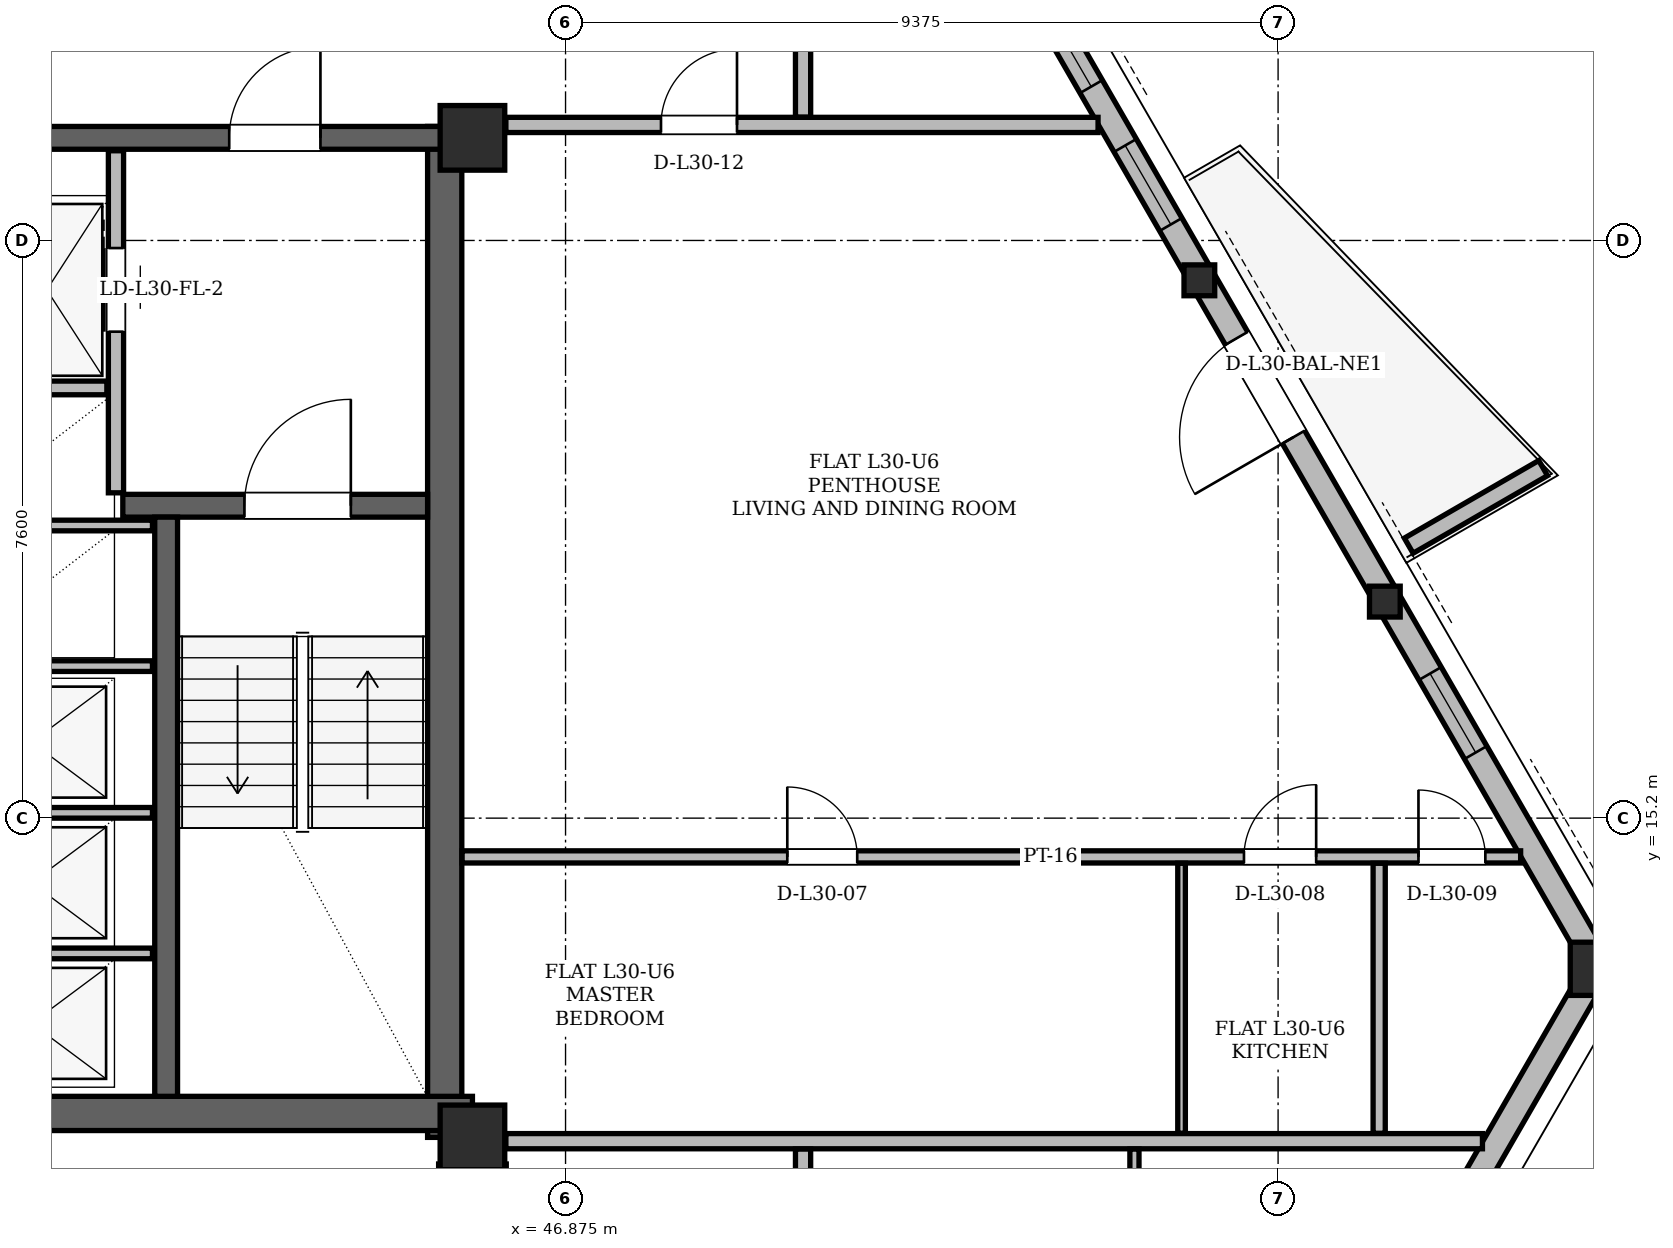
"""IFC4 building model, lengths in metres.
Left out: names, types, materials, properties, quantities, classifications, styles, units other than length and angle.
Written with IfcOpenShell. Run it as: python <this file> out.ifc"""

import sys

from ifc_helpers import new_model, si_unit, direction, frame, frame_2d, origin, origin_2d, place, context, subcontext, project, spatial, polyline, rectangle, hollow_rectangle, i_section, outline, extrude, element, fill, save


model = new_model("IFC4")
c1 = context("Model", 3, precision=1e-05, world=origin(), true_north=direction((0.0, 1.0)))
c2 = subcontext(c1, "Body", "Model", "MODEL_VIEW")
j1 = project(units=[si_unit("LENGTHUNIT", "METRE"), si_unit("PLANEANGLEUNIT", "RADIAN")], contexts=[c1])
p1 = place(None, origin())
s1 = spatial("IfcSite", under=j1, at=p1, CompositionType="ELEMENT")
p2 = place(p1, origin())
s2 = spatial("IfcBuilding", under=s1, at=p2, CompositionType="ELEMENT")
p3 = place(p2, frame((0.0, 0.0, 115.8)))
s3 = spatial("IfcBuildingStorey", under=s2, at=p3, CompositionType="ELEMENT", Elevation=115.8)
for number, where, z_axis, x_axis in (
    (1, (45.65, 11.0, 0.0), (0.0, 0.0, 1.0), (1.0, 0.0, 0.0)),
    (2, (45.65, 24.15, 0.0), (0.0, 0.0, 1.0), (1.0, 0.0, 0.0)),
):
    element("IfcColumn", number, at=place(p3, frame(where, z_axis=z_axis, x_axis=x_axis)), inside=s3, PredefinedType="COLUMN", context=c2, shape_type="SweptSolid", body=[
        extrude(hollow_rectangle(XDim=0.85, YDim=0.85, WallThickness=0.07, at=origin_2d()), origin(), (0.0, 0.0, 1.0), 3.6),
    ])
p4 = place(p3, frame((60.471, 13.255, 0.004), z_axis=(-0.015019891197, -0.020728809118, 0.999672305979), x_axis=(0.809768124835, -0.586750018323, 0.0)))
e3 = element("IfcColumn", 3, at=p4, inside=s3, PredefinedType="COLUMN", context=c2, shape_type="SweptSolid", body=[
    extrude(hollow_rectangle(XDim=0.7, YDim=0.7, WallThickness=0.055, at=origin_2d()), origin(), (0.0, 0.0, 1.0), 3.592),
])
for number, where, z_axis, x_axis in (
    (4, (57.685, 18.081, 0.004), (-0.017, -0.018, 1.0), (0.73, -0.683, 0.0)),
    (5, (55.247, 22.303, 0.004), (-0.018, -0.015, 1.0), (0.646, -0.763, 0.0)),
):
    element("IfcColumn", number, at=place(p3, frame(where, z_axis=z_axis, x_axis=x_axis)), inside=s3, PredefinedType="COLUMN", context=c2, shape_type="SweptSolid", body=[
        extrude(i_section(OverallWidth=0.404, OverallDepth=0.406, WebThickness=0.027, FlangeThickness=0.044, at=origin_2d()), origin(), (0.0, 0.0, 1.0), 3.592),
    ])
p5 = place(p3, frame((45.285, 11.0, 0.0), z_axis=(0.0, 0.0, 1.0), x_axis=(0.0, 1.0, 0.0)))
e6 = element("IfcWall", 6, at=p5, inside=s3, PredefinedType="SHEAR", context=c2, shape_type="SweptSolid", body=[
    extrude(rectangle(XDim=13.3, YDim=0.45, at=frame_2d((6.65, 0.0))), origin(), (0.0, 0.0, 1.0), 3.36),
])
p6 = place(p3, frame((38.55, 11.315, 0.0), z_axis=(0.0, 0.0, 1.0), x_axis=(1.0, 0.0, 0.0)))
e7 = element("IfcWall", 7, at=p6, inside=s3, PredefinedType="SHEAR", context=c2, shape_type="SweptSolid", body=[
    extrude(rectangle(XDim=7.1, YDim=0.45, at=frame_2d((3.55, 0.0))), origin(), (0.0, 0.0, 1.0), 3.36),
])
p7 = place(p3, frame((29.65, 24.15, 0.0), z_axis=(0.0, 0.0, 1.0), x_axis=(1.0, 0.0, 0.0)))
e8 = element("IfcWall", 8, at=p7, inside=s3, PredefinedType="SHEAR", context=c2, shape_type="SweptSolid", body=[
    extrude(rectangle(XDim=15.7, YDim=0.3, at=frame_2d((7.85, 0.0))), origin(), (0.0, 0.0, 1.0), 3.36),
])
p8 = place(p7, frame((1.7, 0.0, 0.0)))
e9 = element("IfcOpeningElement", 9, at=p8, cuts=e8, PredefinedType="OPENING", context=c2, shape_type="SweptSolid", body=[
    extrude(rectangle(XDim=1.2, YDim=2.2, at=frame_2d((0.6, 1.1))), frame((0.0, 0.15, 0.0), z_axis=(0.0, -1.0, 0.0), x_axis=(1.0, 0.0, 0.0)), (0.0, 0.0, 1.0), 0.3),
])
p9 = place(p7, frame((12.8, 0.0, 0.0)))
e10 = element("IfcOpeningElement", 10, at=p9, cuts=e8, PredefinedType="OPENING", context=c2, shape_type="SweptSolid", body=[
    extrude(rectangle(XDim=1.2, YDim=2.2, at=frame_2d((0.6, 1.1))), frame((0.0, 0.15, 0.0), z_axis=(0.0, -1.0, 0.0), x_axis=(1.0, 0.0, 0.0)), (0.0, 0.0, 1.0), 0.3),
])
p10 = place(p7, frame((6.55, 0.0, 0.0)))
e11 = element("IfcOpeningElement", 11, at=p10, cuts=e8, PredefinedType="OPENING", context=c2, shape_type="SweptSolid", body=[
    extrude(rectangle(XDim=0.9, YDim=2.05, at=frame_2d((0.45, 1.025))), frame((0.0, 0.15, 0.0), z_axis=(0.0, -1.0, 0.0), x_axis=(1.0, 0.0, 0.0)), (0.0, 0.0, 1.0), 0.3),
])
p11 = place(p7, frame((8.45, 0.0, 0.0)))
e12 = element("IfcOpeningElement", 12, at=p11, cuts=e8, PredefinedType="OPENING", context=c2, shape_type="SweptSolid", body=[
    extrude(rectangle(XDim=0.9, YDim=2.05, at=frame_2d((0.45, 1.025))), frame((0.0, 0.15, 0.0), z_axis=(0.0, -1.0, 0.0), x_axis=(1.0, 0.0, 0.0)), (0.0, 0.0, 1.0), 0.3),
])
p12 = place(p3, frame((41.05, 19.31, 0.0), z_axis=(0.0, 0.0, 1.0), x_axis=(1.0, 0.0, 0.0)))
e13 = element("IfcWall", 13, at=p12, inside=s3, PredefinedType="SHEAR", context=c2, shape_type="SweptSolid", body=[
    extrude(rectangle(XDim=4.01, YDim=0.3, at=frame_2d((2.005, 0.0))), origin(), (0.0, 0.0, 1.0), 3.36),
])
p13 = place(p12, frame((1.6, 0.0, 0.0)))
e14 = element("IfcOpeningElement", 14, at=p13, cuts=e13, PredefinedType="OPENING", context=c2, shape_type="SweptSolid", body=[
    extrude(rectangle(XDim=1.4, YDim=2.2, at=frame_2d((0.7, 1.1))), frame((0.0, 0.15, 0.0), z_axis=(0.0, -1.0, 0.0), x_axis=(1.0, 0.0, 0.0)), (0.0, 0.0, 1.0), 0.3),
])
p14 = place(p3, frame((41.62, 11.54, 0.0), z_axis=(0.0, 0.0, 1.0), x_axis=(0.0, 1.0, 0.0)))
e15 = element("IfcWall", 15, at=p14, inside=s3, PredefinedType="SHEAR", context=c2, shape_type="SweptSolid", body=[
    extrude(rectangle(XDim=7.62, YDim=0.3, at=frame_2d((3.81, 0.0))), origin(), (0.0, 0.0, 1.0), 3.36),
])
p15 = place(p3, frame((54.913, 3.629, 0.0), z_axis=(0.0, 0.0, 1.0), x_axis=(0.500013359164, 0.86601769073, 0.0)))
e16 = element("IfcWall", 16, at=p15, inside=s3, PredefinedType="SOLIDWALL", context=c2, shape_type="SweptSolid", body=[
    extrude(rectangle(XDim=11.115, YDim=0.34, at=frame_2d((5.558, 0.0))), origin(), (0.0, 0.0, 1.0), 2.578),
])
p16 = place(p3, frame((60.471, 13.255, 0.0), z_axis=(0.0, 0.0, 1.0), x_axis=(-0.500009004027, 0.866020205245, 0.0)))
e17 = element("IfcWall", 17, at=p16, inside=s3, PredefinedType="SOLIDWALL", context=c2, shape_type="SweptSolid", body=[
    extrude(rectangle(XDim=15.463, YDim=0.34, at=frame_2d((7.731, 0.0))), origin(), (0.0, 0.0, 1.0), 2.578),
])
p17 = place(p16, frame((8.034, 0.0, 0.0)))
e18 = element("IfcOpeningElement", 18, at=p17, cuts=e17, PredefinedType="OPENING", context=c2, shape_type="SweptSolid", body=[
    extrude(rectangle(XDim=1.5, YDim=2.2, at=frame_2d((0.75, 1.1))), frame((0.0, 0.17, 0.0), z_axis=(0.0, -1.0, 0.0), x_axis=(1.0, 0.0, 0.0)), (0.0, 0.0, 1.0), 0.34),
])
p18 = place(p16, frame((3.242, 0.0, 0.85)))
e19 = element("IfcOpeningElement", 19, at=p18, cuts=e17, PredefinedType="OPENING", context=c2, shape_type="SweptSolid", body=[
    extrude(rectangle(XDim=1.2, YDim=1.48, at=frame_2d((0.6, 0.74))), frame((0.0, 0.17, 0.0), z_axis=(0.0, -1.0, 0.0), x_axis=(1.0, 0.0, 0.0)), (0.0, 0.0, 1.0), 0.34),
])
p19 = place(p16, frame((11.264, 0.0, 0.85)))
e20 = element("IfcOpeningElement", 20, at=p19, cuts=e17, PredefinedType="OPENING", context=c2, shape_type="SweptSolid", body=[
    extrude(rectangle(XDim=1.2, YDim=1.48, at=frame_2d((0.6, 0.74))), frame((0.0, 0.17, 0.0), z_axis=(0.0, -1.0, 0.0), x_axis=(1.0, 0.0, 0.0)), (0.0, 0.0, 1.0), 0.34),
])
p20 = place(p16, frame((13.359, 0.0, 0.85)))
e21 = element("IfcOpeningElement", 21, at=p20, cuts=e17, PredefinedType="OPENING", context=c2, shape_type="SweptSolid", body=[
    extrude(rectangle(XDim=1.2, YDim=1.48, at=frame_2d((0.6, 0.74))), frame((0.0, 0.17, 0.0), z_axis=(0.0, -1.0, 0.0), x_axis=(1.0, 0.0, 0.0)), (0.0, 0.0, 1.0), 0.34),
])
p21 = place(p3, frame((57.969, 18.784, 0.0), z_axis=(0.0, 0.0, 1.0), x_axis=(0.866042246008, 0.499970827278, 0.0)))
e22 = element("IfcWall", 22, at=p21, inside=s3, PredefinedType="PARAPET", context=c2, shape_type="SweptSolid", body=[
    extrude(outline(polyline([(0.0, 0.0), (2.042, 0.0), (2.042, 1.1), (0.0, 1.32), (0.0, 0.0)])), frame((0.0, 0.115, 0.0), z_axis=(0.0, -1.0, 0.0), x_axis=(1.0, 0.0, 0.0)), (0.0, 0.0, 1.0), 0.23),
])
p22 = place(p3, frame((40.96, 19.48, 0.0), z_axis=(0.0, 0.0, 1.0), x_axis=(0.0, 1.0, 0.0)))
e23 = element("IfcWall", 23, at=p22, inside=s3, PredefinedType="PARTITIONING", context=c2, shape_type="SweptSolid", body=[
    extrude(rectangle(XDim=4.5, YDim=0.2, at=frame_2d((2.25, 0.0))), origin(), (0.0, 0.0, 1.0), 2.4),
])
p23 = place(p22, frame((2.12, 0.0, 0.0)))
e24 = element("IfcOpeningElement", 24, at=p23, cuts=e23, PredefinedType="OPENING", context=c2, shape_type="SweptSolid", body=[
    extrude(rectangle(XDim=1.1, YDim=2.2, at=frame_2d((0.55, 1.1))), frame((0.0, 0.1, 0.0), z_axis=(0.0, -1.0, 0.0), x_axis=(1.0, 0.0, 0.0)), (0.0, 0.0, 1.0), 0.2),
])
p24 = place(p3, frame((39.26, 20.86, 0.0), z_axis=(0.0, 0.0, 1.0), x_axis=(1.0, 0.0, 0.0)))
e25 = element("IfcWall", 25, at=p24, inside=s3, PredefinedType="PARTITIONING", context=c2, shape_type="SweptSolid", body=[
    extrude(rectangle(XDim=1.58, YDim=0.18, at=frame_2d((0.79, 0.0))), origin(), (0.0, 0.0, 1.0), 3.36),
])
for number, where, z_axis, x_axis in (
    (26, (38.78, 13.42, 0.0), (0.0, 0.0, 1.0), (1.0, 0.0, 0.0)),
    (27, (38.78, 15.27, 0.0), (0.0, 0.0, 1.0), (1.0, 0.0, 0.0)),
    (28, (38.78, 17.2, 0.0), (0.0, 0.0, 1.0), (1.0, 0.0, 0.0)),
    (29, (38.78, 19.05, 0.0), (0.0, 0.0, 1.0), (1.0, 0.0, 0.0)),
):
    element("IfcWall", number, at=place(p3, frame(where, z_axis=z_axis, x_axis=x_axis)), inside=s3, PredefinedType="PARTITIONING", context=c2, shape_type="SweptSolid", body=[
        extrude(rectangle(XDim=2.66, YDim=0.14, at=frame_2d((1.33, 0.0))), origin(), (0.0, 0.0, 1.0), 3.36),
    ])
p25 = place(p3, frame((45.205, 10.55, 0.0), z_axis=(0.0, 0.0, 1.0), x_axis=(1.0, 0.0, 0.0)))
e30 = element("IfcWall", 30, at=p25, inside=s3, PredefinedType="PARTITIONING", context=c2, shape_type="SweptSolid", body=[
    extrude(rectangle(XDim=0.89, YDim=0.2, at=frame_2d((0.445, 0.0))), origin(), (0.0, 0.0, 1.0), 3.36),
])
p26 = place(p3, frame((46.09, 10.95, 0.0), z_axis=(0.0, 0.0, 1.0), x_axis=(1.0, 0.0, 0.0)))
e31 = element("IfcWall", 31, at=p26, inside=s3, PredefinedType="PARTITIONING", context=c2, shape_type="SweptSolid", body=[
    extrude(rectangle(XDim=12.849, YDim=0.2, at=frame_2d((6.424, 0.0))), origin(), (0.0, 0.0, 1.0), 2.814),
])
p27 = place(p3, frame((45.514, 14.69, 0.0), z_axis=(0.0, 0.0, 1.0), x_axis=(1.0, 0.0, 0.0)))
e32 = element("IfcWall", 32, at=p27, inside=s3, PredefinedType="PARTITIONING", context=c2, shape_type="SweptSolid", body=[
    extrude(rectangle(XDim=13.927, YDim=0.16, at=frame_2d((6.964, 0.0))), origin(), (0.0, 0.0, 1.0), 2.4),
])
p28 = place(p27, frame((4.279, 0.0, 0.0)))
e33 = element("IfcOpeningElement", 33, at=p28, cuts=e32, PredefinedType="OPENING", context=c2, shape_type="SweptSolid", body=[
    extrude(rectangle(XDim=0.92, YDim=2.12, at=frame_2d((0.46, 1.06))), frame((0.0, 0.08, 0.0), z_axis=(0.0, -1.0, 0.0), x_axis=(1.0, 0.0, 0.0)), (0.0, 0.0, 1.0), 0.16),
])
p29 = place(p27, frame((10.287, 0.0, 0.0)))
e34 = element("IfcOpeningElement", 34, at=p29, cuts=e32, PredefinedType="OPENING", context=c2, shape_type="SweptSolid", body=[
    extrude(rectangle(XDim=0.95, YDim=2.1, at=frame_2d((0.475, 1.05))), frame((0.0, 0.08, 0.0), z_axis=(0.0, -1.0, 0.0), x_axis=(1.0, 0.0, 0.0)), (0.0, 0.0, 1.0), 0.16),
])
p30 = place(p27, frame((12.583, 0.0, 0.0)))
e35 = element("IfcOpeningElement", 35, at=p30, cuts=e32, PredefinedType="OPENING", context=c2, shape_type="SweptSolid", body=[
    extrude(rectangle(XDim=0.88, YDim=2.08, at=frame_2d((0.44, 1.04))), frame((0.0, 0.08, 0.0), z_axis=(0.0, -1.0, 0.0), x_axis=(1.0, 0.0, 0.0)), (0.0, 0.0, 1.0), 0.16),
])
p31 = place(p3, frame((46.09, 24.32, 0.0), z_axis=(0.0, 0.0, 1.0), x_axis=(1.0, 0.0, 0.0)))
e36 = element("IfcWall", 36, at=p31, inside=s3, PredefinedType="PARTITIONING", context=c2, shape_type="SweptSolid", body=[
    extrude(rectangle(XDim=7.791, YDim=0.2, at=frame_2d((3.896, 0.0))), origin(), (0.0, 0.0, 1.0), 2.946),
])
p32 = place(p31, frame((2.041, 0.0, 0.0)))
e37 = element("IfcOpeningElement", 37, at=p32, cuts=e36, PredefinedType="OPENING", context=c2, shape_type="SweptSolid", body=[
    extrude(rectangle(XDim=1.0, YDim=2.18, at=frame_2d((0.5, 1.09))), frame((0.0, 0.1, 0.0), z_axis=(0.0, -1.0, 0.0), x_axis=(1.0, 0.0, 0.0)), (0.0, 0.0, 1.0), 0.2),
])
for number, where, z_axis, x_axis in (
    (38, (50.0, 9.404, 0.0), (0.0, 0.0, 1.0), (0.0, 1.0, 0.0)),
    (39, (50.0, 24.424, 0.0), (0.0, 0.0, 1.0), (0.0, 1.0, 0.0)),
):
    element("IfcWall", number, at=place(p3, frame(where, z_axis=z_axis, x_axis=x_axis)), inside=s3, PredefinedType="PARTITIONING", context=c2, shape_type="SweptSolid", body=[
        extrude(rectangle(XDim=1.442, YDim=0.2, at=frame_2d((0.721, 0.0))), origin(), (0.0, 0.0, 1.0), 3.36),
    ])
p33 = place(p3, frame((54.36, 3.803, 0.0), z_axis=(0.0, 0.0, 1.0), x_axis=(0.0, 1.0, 0.0)))
e40 = element("IfcWall", 40, at=p33, inside=s3, PredefinedType="PARTITIONING", context=c2, shape_type="SweptSolid", body=[
    extrude(rectangle(XDim=7.043, YDim=0.12, at=frame_2d((3.521, 0.0))), origin(), (0.0, 0.0, 1.0), 2.814),
])
p34 = place(p33, frame((3.121, 0.0, 0.0)))
e41 = element("IfcOpeningElement", 41, at=p34, cuts=e40, PredefinedType="OPENING", context=c2, shape_type="SweptSolid", body=[
    extrude(rectangle(XDim=0.88, YDim=2.08, at=frame_2d((0.44, 1.04))), frame((0.0, 0.06, 0.0), z_axis=(0.0, -1.0, 0.0), x_axis=(1.0, 0.0, 0.0)), (0.0, 0.0, 1.0), 0.12),
])
p35 = place(p3, frame((54.98, 11.054, 0.0), z_axis=(0.0, 0.0, 1.0), x_axis=(0.0, 1.0, 0.0)))
e42 = element("IfcWall", 42, at=p35, inside=s3, PredefinedType="PARTITIONING", context=c2, shape_type="SweptSolid", body=[
    extrude(rectangle(XDim=3.552, YDim=0.1, at=frame_2d((1.776, 0.0))), origin(), (0.0, 0.0, 1.0), 2.814),
])
p36 = place(p3, frame((57.58, 11.054, 0.0), z_axis=(0.0, 0.0, 1.0), x_axis=(0.0, 1.0, 0.0)))
e43 = element("IfcWall", 43, at=p36, inside=s3, PredefinedType="PARTITIONING", context=c2, shape_type="SweptSolid", body=[
    extrude(rectangle(XDim=3.552, YDim=0.16, at=frame_2d((1.776, 0.0))), origin(), (0.0, 0.0, 1.0), 2.814),
])
p37 = place(p17, origin())
e44 = element("IfcDoor", 44, at=p37, inside=s3, OperationType="SINGLE_SWING_LEFT", PredefinedType="DOOR", context=c2, shape_type="SweptSolid", body=[
    extrude(rectangle(XDim=1.5, YDim=2.2, at=frame_2d((0.75, 1.1))), frame((0.0, 0.025, 0.0), z_axis=(0.0, -1.0, 0.0), x_axis=(1.0, 0.0, 0.0)), (0.0, 0.0, 1.0), 0.05),
])
fill(e18, e44)
p38 = place(p18, origin())
e45 = element("IfcWindow", 45, at=p38, inside=s3, PartitioningType="SINGLE_PANEL", PredefinedType="WINDOW", context=c2, shape_type="SweptSolid", body=[
    extrude(rectangle(XDim=1.2, YDim=1.48, at=frame_2d((0.6, 0.74))), frame((0.0, 0.03, 0.0), z_axis=(0.0, -1.0, 0.0), x_axis=(1.0, 0.0, 0.0)), (0.0, 0.0, 1.0), 0.06),
])
fill(e19, e45)
p39 = place(p19, origin())
e46 = element("IfcWindow", 46, at=p39, inside=s3, PartitioningType="SINGLE_PANEL", PredefinedType="WINDOW", context=c2, shape_type="SweptSolid", body=[
    extrude(rectangle(XDim=1.2, YDim=1.48, at=frame_2d((0.6, 0.74))), frame((0.0, 0.03, 0.0), z_axis=(0.0, -1.0, 0.0), x_axis=(1.0, 0.0, 0.0)), (0.0, 0.0, 1.0), 0.06),
])
fill(e20, e46)
p40 = place(p20, origin())
e47 = element("IfcWindow", 47, at=p40, inside=s3, PartitioningType="SINGLE_PANEL", PredefinedType="WINDOW", context=c2, shape_type="SweptSolid", body=[
    extrude(rectangle(XDim=1.2, YDim=1.48, at=frame_2d((0.6, 0.74))), frame((0.0, 0.03, 0.0), z_axis=(0.0, -1.0, 0.0), x_axis=(1.0, 0.0, 0.0)), (0.0, 0.0, 1.0), 0.06),
])
fill(e21, e47)
p41 = place(p23, origin())
e48 = element("IfcDoor", 48, at=p41, inside=s3, OperationType="SLIDING_TO_RIGHT", PredefinedType="DOOR", context=c2, shape_type="SweptSolid", body=[
    extrude(rectangle(XDim=1.1, YDim=2.2, at=frame_2d((0.55, 1.1))), frame((0.0, 0.025, 0.0), z_axis=(0.0, -1.0, 0.0), x_axis=(1.0, 0.0, 0.0)), (0.0, 0.0, 1.0), 0.05),
])
fill(e24, e48)
p42 = place(p13, origin())
e49 = element("IfcDoor", 49, at=p42, inside=s3, OperationType="SINGLE_SWING_RIGHT", PredefinedType="DOOR", context=c2, shape_type="SweptSolid", body=[
    extrude(rectangle(XDim=1.4, YDim=2.2, at=frame_2d((0.7, 1.1))), frame((0.0, 0.025, 0.0), z_axis=(0.0, -1.0, 0.0), x_axis=(1.0, 0.0, 0.0)), (0.0, 0.0, 1.0), 0.05),
])
fill(e14, e49)
p43 = place(p9, origin())
e50 = element("IfcDoor", 50, at=p43, inside=s3, OperationType="SINGLE_SWING_RIGHT", PredefinedType="DOOR", context=c2, shape_type="SweptSolid", body=[
    extrude(rectangle(XDim=1.2, YDim=2.2, at=frame_2d((0.6, 1.1))), frame((0.0, 0.025, 0.0), z_axis=(0.0, -1.0, 0.0), x_axis=(1.0, 0.0, 0.0)), (0.0, 0.0, 1.0), 0.05),
])
fill(e10, e50)
p44 = place(p28, origin())
e51 = element("IfcDoor", 51, at=p44, inside=s3, OperationType="SINGLE_SWING_LEFT", PredefinedType="DOOR", context=c2, shape_type="SweptSolid", body=[
    extrude(rectangle(XDim=0.92, YDim=2.12, at=frame_2d((0.46, 1.06))), frame((0.0, 0.025, 0.0), z_axis=(0.0, -1.0, 0.0), x_axis=(1.0, 0.0, 0.0)), (0.0, 0.0, 1.0), 0.05),
])
fill(e33, e51)
p45 = place(p29, origin())
e52 = element("IfcDoor", 52, at=p45, inside=s3, OperationType="SINGLE_SWING_RIGHT", PredefinedType="DOOR", context=c2, shape_type="SweptSolid", body=[
    extrude(rectangle(XDim=0.95, YDim=2.1, at=frame_2d((0.475, 1.05))), frame((0.0, 0.025, 0.0), z_axis=(0.0, -1.0, 0.0), x_axis=(1.0, 0.0, 0.0)), (0.0, 0.0, 1.0), 0.05),
])
fill(e34, e52)
p46 = place(p30, origin())
e53 = element("IfcDoor", 53, at=p46, inside=s3, OperationType="SINGLE_SWING_LEFT", PredefinedType="DOOR", context=c2, shape_type="SweptSolid", body=[
    extrude(rectangle(XDim=0.88, YDim=2.08, at=frame_2d((0.44, 1.04))), frame((0.0, 0.025, 0.0), z_axis=(0.0, -1.0, 0.0), x_axis=(1.0, 0.0, 0.0)), (0.0, 0.0, 1.0), 0.05),
])
fill(e35, e53)
p47 = place(p32, origin())
e54 = element("IfcDoor", 54, at=p47, inside=s3, OperationType="SINGLE_SWING_RIGHT", PredefinedType="DOOR", context=c2, shape_type="SweptSolid", body=[
    extrude(rectangle(XDim=1.0, YDim=2.18, at=frame_2d((0.5, 1.09))), frame((0.0, 0.025, 0.0), z_axis=(0.0, -1.0, 0.0), x_axis=(1.0, 0.0, 0.0)), (0.0, 0.0, 1.0), 0.05),
])
fill(e37, e54)
save(model, sys.argv[1])
